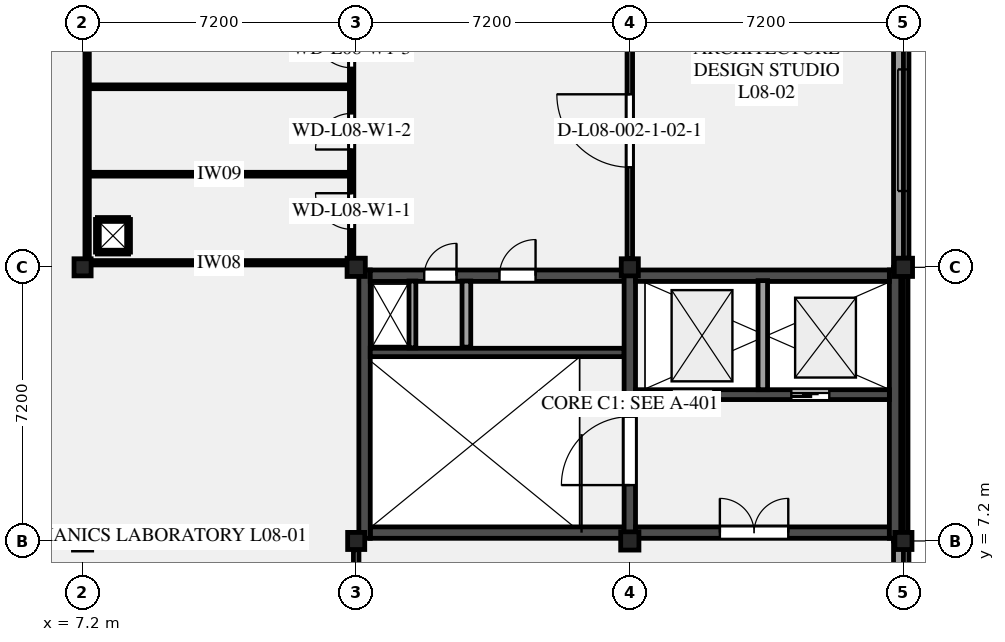
"""IFC4 building model, lengths in metres.
Left out: names, types, materials, properties, quantities, classifications, styles, units other than length and angle.
Written with IfcOpenShell. Run it as: python <this file> out.ifc"""

import sys

from ifc_helpers import new_model, si_unit, direction, frame, frame_2d, origin, origin_2d, place, context, subcontext, project, spatial, rectangle, extrude, element, fill, save


model = new_model("IFC4")
c1 = context("Model", 3, precision=1e-05, world=origin(), true_north=direction((0.0, 1.0)))
c2 = subcontext(c1, "Body", "Model", "MODEL_VIEW")
j1 = project(units=[si_unit("LENGTHUNIT", "METRE"), si_unit("PLANEANGLEUNIT", "RADIAN")], contexts=[c1])
p1 = place(None, origin())
s1 = spatial("IfcSite", under=j1, at=p1, CompositionType="ELEMENT")
p2 = place(p1, origin())
s2 = spatial("IfcBuilding", under=s1, at=p2, CompositionType="ELEMENT")
p3 = place(p2, frame((0.0, 0.0, 34.5)))
s3 = spatial("IfcBuildingStorey", under=s2, at=p3, CompositionType="ELEMENT", Elevation=34.5)
p4 = place(p3, frame((7.2, 7.2, 0.0), z_axis=(0.0, 0.0, 1.0), x_axis=(1.0, 0.0, 0.0)))
e1 = element("IfcColumn", 1, at=p4, inside=s3, PredefinedType="COLUMN", context=c2, shape_type="SweptSolid", body=[
    extrude(rectangle(XDim=0.48, YDim=0.48, at=origin_2d()), origin(), (0.0, 0.0, 1.0), 3.695),
])
for number, where, z_axis, x_axis in (
    (2, (7.2, 14.4, 0.0), (0.0, 0.0, 1.0), (1.0, 0.0, 0.0)),
    (3, (14.4, 7.2, 0.0), (0.0, 0.0, 1.0), (1.0, 0.0, 0.0)),
):
    element("IfcColumn", number, at=place(p3, frame(where, z_axis=z_axis, x_axis=x_axis)), inside=s3, PredefinedType="COLUMN", context=c2, shape_type="SweptSolid", body=[
        extrude(rectangle(XDim=0.45, YDim=0.45, at=origin_2d()), origin(), (0.0, 0.0, 1.0), 3.695),
    ])
for number, where, z_axis, x_axis in (
    (4, (14.4, 14.4, 0.0), (0.0, 0.0, 1.0), (1.0, 0.0, 0.0)),
    (5, (21.6, 7.2, 0.0), (0.0, 0.0, 1.0), (1.0, 0.0, 0.0)),
):
    element("IfcColumn", number, at=place(p3, frame(where, z_axis=z_axis, x_axis=x_axis)), inside=s3, PredefinedType="COLUMN", context=c2, shape_type="SweptSolid", body=[
        extrude(rectangle(XDim=0.48, YDim=0.48, at=origin_2d()), origin(), (0.0, 0.0, 1.0), 3.695),
    ])
for number, where, z_axis, x_axis in (
    (6, (21.6, 14.4, 0.0), (0.0, 0.0, 1.0), (1.0, 0.0, 0.0)),
    (7, (28.8, 7.2, 0.0), (0.0, 0.0, 1.0), (1.0, 0.0, 0.0)),
):
    element("IfcColumn", number, at=place(p3, frame(where, z_axis=z_axis, x_axis=x_axis)), inside=s3, PredefinedType="COLUMN", context=c2, shape_type="SweptSolid", body=[
        extrude(rectangle(XDim=0.45, YDim=0.45, at=origin_2d()), origin(), (0.0, 0.0, 1.0), 3.695),
    ])
p5 = place(p3, frame((28.8, 14.4, 0.0), z_axis=(0.0, 0.0, 1.0), x_axis=(1.0, 0.0, 0.0)))
e8 = element("IfcColumn", 8, at=p5, inside=s3, PredefinedType="COLUMN", context=c2, shape_type="SweptSolid", body=[
    extrude(rectangle(XDim=0.48, YDim=0.48, at=origin_2d()), origin(), (0.0, 0.0, 1.0), 3.695),
])
p6 = place(p3, frame((28.8, 21.375, 0.0), z_axis=(0.0, 0.0, 1.0), x_axis=(0.0, -1.0, 0.0)))
e9 = element("IfcWall", 9, at=p6, inside=s3, PredefinedType="STANDARD", context=c2, shape_type="SweptSolid", body=[
    extrude(rectangle(XDim=6.735, YDim=0.29, at=frame_2d((3.368, 0.0))), origin(), (0.0, 0.0, 1.0), 2.89),
])
p7 = place(p6, frame((1.768, 0.0, 0.98)))
e10 = element("IfcOpeningElement", 10, at=p7, cuts=e9, PredefinedType="OPENING", context=c2, shape_type="SweptSolid", body=[
    extrude(rectangle(XDim=3.2, YDim=1.45, at=frame_2d((1.6, 0.725))), frame((0.0, 0.155, 0.0), z_axis=(0.0, -1.0, 0.0), x_axis=(1.0, 0.0, 0.0)), (0.0, 0.0, 1.0), 0.31),
])
p8 = place(p3, frame((28.8, 14.16, 0.0), z_axis=(0.0, 0.0, 1.0), x_axis=(0.0, -1.0, 0.0)))
e11 = element("IfcWall", 11, at=p8, inside=s3, PredefinedType="STANDARD", context=c2, shape_type="SweptSolid", body=[
    extrude(rectangle(XDim=6.735, YDim=0.24, at=frame_2d((3.367, 0.0))), origin(), (0.0, 0.0, 1.0), 2.89),
])
p9 = place(p3, frame((28.8, 6.975, 0.0), z_axis=(0.0, 0.0, 1.0), x_axis=(0.0, -1.0, 0.0)))
e12 = element("IfcWall", 12, at=p9, inside=s3, PredefinedType="STANDARD", context=c2, shape_type="SweptSolid", body=[
    extrude(rectangle(XDim=6.735, YDim=0.29, at=frame_2d((3.368, 0.0))), origin(), (0.0, 0.0, 1.0), 2.89),
])
p10 = place(p9, frame((2.167, 0.0, 0.98)))
e13 = element("IfcOpeningElement", 13, at=p10, cuts=e12, PredefinedType="OPENING", context=c2, shape_type="SweptSolid", body=[
    extrude(rectangle(XDim=2.4, YDim=1.4, at=frame_2d((1.2, 0.7))), frame((0.0, 0.155, 0.0), z_axis=(0.0, -1.0, 0.0), x_axis=(1.0, 0.0, 0.0)), (0.0, 0.0, 1.0), 0.31),
])
p11 = place(p3, frame((28.67, 21.6, 3.695), z_axis=(0.0, 0.0, 1.0), x_axis=(0.0, -1.0, 0.0)))
e14 = element("IfcWall", 14, at=p11, inside=s3, PredefinedType="PARAPET", context=c2, shape_type="SweptSolid", body=[
    extrude(rectangle(XDim=7.2, YDim=0.26, at=frame_2d((3.6, 0.0))), origin(), (0.0, 0.0, 1.0), 1.105),
])
p12 = place(p3, frame((28.67, 14.4, 3.9), z_axis=(0.0, 0.0, 1.0), x_axis=(0.0, -1.0, 0.0)))
e15 = element("IfcWall", 15, at=p12, inside=s3, PredefinedType="PARAPET", context=c2, shape_type="SweptSolid", body=[
    extrude(rectangle(XDim=7.2, YDim=0.26, at=frame_2d((3.6, 0.0))), origin(), (0.0, 0.0, 1.0), 0.9),
])
p13 = place(p3, frame((28.67, 7.2, 3.695), z_axis=(0.0, 0.0, 1.0), x_axis=(0.0, -1.0, 0.0)))
e16 = element("IfcWall", 16, at=p13, inside=s3, PredefinedType="PARAPET", context=c2, shape_type="SweptSolid", body=[
    extrude(rectangle(XDim=7.2, YDim=0.26, at=frame_2d((3.6, 0.0))), origin(), (0.0, 0.0, 1.0), 1.105),
])
p14 = place(p3, frame((14.77, 7.42, 0.0), z_axis=(0.0, 0.0, 1.0), x_axis=(1.0, 0.0, 0.0)))
e17 = element("IfcWall", 17, at=p14, inside=s3, PredefinedType="SHEAR", context=c2, shape_type="SweptSolid", body=[
    extrude(rectangle(XDim=6.68, YDim=0.3, at=frame_2d((3.34, 0.0))), origin(), (0.0, 0.0, 1.0), 3.9),
])
p15 = place(p3, frame((14.62, 14.33, 0.0), z_axis=(0.0, 0.0, 1.0), x_axis=(0.0, -1.0, 0.0)))
e18 = element("IfcWall", 18, at=p15, inside=s3, PredefinedType="SHEAR", context=c2, shape_type="SweptSolid", body=[
    extrude(rectangle(XDim=7.06, YDim=0.3, at=frame_2d((3.53, 0.0))), origin(), (0.0, 0.0, 1.0), 3.9),
])
p16 = place(p3, frame((14.77, 14.18, 0.0), z_axis=(0.0, 0.0, 1.0), x_axis=(1.0, 0.0, 0.0)))
e19 = element("IfcWall", 19, at=p16, inside=s3, PredefinedType="SHEAR", context=c2, shape_type="SweptSolid", body=[
    extrude(rectangle(XDim=6.68, YDim=0.3, at=frame_2d((3.34, 0.0))), origin(), (0.0, 0.0, 1.0), 3.9),
])
p17 = place(p16, frame((1.42, 0.0, 0.0)))
e20 = element("IfcOpeningElement", 20, at=p17, cuts=e19, PredefinedType="OPENING", context=c2, shape_type="SweptSolid", body=[
    extrude(rectangle(XDim=0.85, YDim=2.1, at=frame_2d((0.425, 1.05))), frame((0.0, 0.16, 0.0), z_axis=(0.0, -1.0, 0.0), x_axis=(1.0, 0.0, 0.0)), (0.0, 0.0, 1.0), 0.32),
])
p18 = place(p16, frame((3.4, 0.0, 0.0)))
e21 = element("IfcOpeningElement", 21, at=p18, cuts=e19, PredefinedType="OPENING", context=c2, shape_type="SweptSolid", body=[
    extrude(rectangle(XDim=0.95, YDim=2.15, at=frame_2d((0.475, 1.075))), frame((0.0, 0.16, 0.0), z_axis=(0.0, -1.0, 0.0), x_axis=(1.0, 0.0, 0.0)), (0.0, 0.0, 1.0), 0.32),
])
p19 = place(p3, frame((14.77, 12.16, 0.0), z_axis=(0.0, 0.0, 1.0), x_axis=(1.0, 0.0, 0.0)))
e22 = element("IfcWall", 22, at=p19, inside=s3, PredefinedType="SHEAR", context=c2, shape_type="SweptSolid", body=[
    extrude(rectangle(XDim=6.68, YDim=0.22, at=frame_2d((3.34, 0.0))), origin(), (0.0, 0.0, 1.0), 3.9),
])
p20 = place(p3, frame((17.3, 12.3, 0.0), z_axis=(0.0, 0.0, 1.0), x_axis=(0.0, 1.0, 0.0)))
e23 = element("IfcWall", 23, at=p20, inside=s3, PredefinedType="PARTITIONING", context=c2, shape_type="SweptSolid", body=[
    extrude(rectangle(XDim=1.74, YDim=0.23, at=frame_2d((0.87, 0.0))), origin(), (0.0, 0.0, 1.0), 3.9),
])
p21 = place(p3, frame((15.88, 12.28, 0.0), z_axis=(0.0, 0.0, 1.0), x_axis=(0.0, 1.0, 0.0)))
e24 = element("IfcWall", 24, at=p21, inside=s3, PredefinedType="PARTITIONING", context=c2, shape_type="SweptSolid", body=[
    extrude(rectangle(XDim=1.76, YDim=0.18, at=frame_2d((0.88, 0.0))), origin(), (0.0, 0.0, 1.0), 3.9),
])
p22 = place(p3, frame((21.6, 7.27, 0.0), z_axis=(0.0, 0.0, 1.0), x_axis=(0.0, 1.0, 0.0)))
e25 = element("IfcWall", 25, at=p22, inside=s3, PredefinedType="SHEAR", context=c2, shape_type="SweptSolid", body=[
    extrude(rectangle(XDim=7.06, YDim=0.3, at=frame_2d((3.53, 0.0))), origin(), (0.0, 0.0, 1.0), 3.9),
])
p23 = place(p22, frame((1.4, 0.0, 0.0)))
e26 = element("IfcOpeningElement", 26, at=p23, cuts=e25, PredefinedType="OPENING", context=c2, shape_type="SweptSolid", body=[
    extrude(rectangle(XDim=1.8, YDim=2.2, at=frame_2d((0.9, 1.1))), frame((0.0, 0.16, 0.0), z_axis=(0.0, -1.0, 0.0), x_axis=(1.0, 0.0, 0.0)), (0.0, 0.0, 1.0), 0.32),
])
p24 = place(p3, frame((21.75, 7.42, 0.0), z_axis=(0.0, 0.0, 1.0), x_axis=(1.0, 0.0, 0.0)))
e27 = element("IfcWall", 27, at=p24, inside=s3, PredefinedType="SHEAR", context=c2, shape_type="SweptSolid", body=[
    extrude(rectangle(XDim=6.68, YDim=0.3, at=frame_2d((3.34, 0.0))), origin(), (0.0, 0.0, 1.0), 3.9),
])
p25 = place(p24, frame((2.22, 0.0, 0.0)))
e28 = element("IfcOpeningElement", 28, at=p25, cuts=e27, PredefinedType="OPENING", context=c2, shape_type="SweptSolid", body=[
    extrude(rectangle(XDim=1.8, YDim=2.2, at=frame_2d((0.9, 1.1))), frame((0.0, 0.16, 0.0), z_axis=(0.0, -1.0, 0.0), x_axis=(1.0, 0.0, 0.0)), (0.0, 0.0, 1.0), 0.32),
])
p26 = place(p3, frame((28.58, 7.27, 0.0), z_axis=(0.0, 0.0, 1.0), x_axis=(0.0, 1.0, 0.0)))
e29 = element("IfcWall", 29, at=p26, inside=s3, PredefinedType="SHEAR", context=c2, shape_type="SweptSolid", body=[
    extrude(rectangle(XDim=7.06, YDim=0.3, at=frame_2d((3.53, 0.0))), origin(), (0.0, 0.0, 1.0), 3.9),
])
p27 = place(p3, frame((21.75, 14.18, 0.0), z_axis=(0.0, 0.0, 1.0), x_axis=(1.0, 0.0, 0.0)))
e30 = element("IfcWall", 30, at=p27, inside=s3, PredefinedType="SHEAR", context=c2, shape_type="SweptSolid", body=[
    extrude(rectangle(XDim=6.68, YDim=0.3, at=frame_2d((3.34, 0.0))), origin(), (0.0, 0.0, 1.0), 3.9),
])
p28 = place(p3, frame((21.75, 11.05, 0.0), z_axis=(0.0, 0.0, 1.0), x_axis=(1.0, 0.0, 0.0)))
e31 = element("IfcWall", 31, at=p28, inside=s3, PredefinedType="SHEAR", context=c2, shape_type="SweptSolid", body=[
    extrude(rectangle(XDim=6.68, YDim=0.26, at=frame_2d((3.34, 0.0))), origin(), (0.0, 0.0, 1.0), 3.9),
])
p29 = place(p28, frame((0.95, 0.0, 0.0)))
e32 = element("IfcOpeningElement", 32, at=p29, cuts=e31, PredefinedType="OPENING", context=c2, shape_type="SweptSolid", body=[
    extrude(rectangle(XDim=1.1, YDim=2.2, at=frame_2d((0.55, 1.1))), frame((0.0, 0.14, 0.0), z_axis=(0.0, -1.0, 0.0), x_axis=(1.0, 0.0, 0.0)), (0.0, 0.0, 1.0), 0.28),
])
p30 = place(p28, frame((4.1, 0.0, 0.0)))
e33 = element("IfcOpeningElement", 33, at=p30, cuts=e31, PredefinedType="OPENING", context=c2, shape_type="SweptSolid", body=[
    extrude(rectangle(XDim=1.0, YDim=2.15, at=frame_2d((0.5, 1.075))), frame((0.0, 0.14, 0.0), z_axis=(0.0, -1.0, 0.0), x_axis=(1.0, 0.0, 0.0)), (0.0, 0.0, 1.0), 0.28),
])
p31 = place(p3, frame((25.1, 11.18, 0.0), z_axis=(0.0, 0.0, 1.0), x_axis=(0.0, 1.0, 0.0)))
e34 = element("IfcWall", 34, at=p31, inside=s3, PredefinedType="PARTITIONING", context=c2, shape_type="SweptSolid", body=[
    extrude(rectangle(XDim=2.87, YDim=0.25, at=frame_2d((1.435, 0.0))), origin(), (0.0, 0.0, 1.0), 3.9),
])
for number, where, z_axis, x_axis in (
    (35, (7.43, 14.52, 0.0), (0.0, 0.0, 1.0), (1.0, 0.0, 0.0)),
    (36, (7.32, 14.63, 0.0), (0.0, 0.0, 1.0), (0.0, 1.0, 0.0)),
):
    element("IfcWall", number, at=place(p3, frame(where, z_axis=z_axis, x_axis=x_axis)), inside=s3, PredefinedType="PARTITIONING", context=c2, shape_type="SweptSolid", body=[
        extrude(rectangle(XDim=6.725, YDim=0.115, at=frame_2d((3.363, 0.0))), origin(), (0.0, 0.0, 1.0), 2.89),
    ])
p32 = place(p3, frame((14.28, 14.645, 0.0), z_axis=(0.0, 0.0, 1.0), x_axis=(0.0, 1.0, 0.0)))
e37 = element("IfcWall", 37, at=p32, inside=s3, PredefinedType="PARTITIONING", context=c2, shape_type="SweptSolid", body=[
    extrude(rectangle(XDim=6.725, YDim=0.115, at=frame_2d((3.363, 0.0))), origin(), (0.0, 0.0, 1.0), 2.89),
])
p33 = place(p32, frame((0.755, 0.0, 0.0)))
e38 = element("IfcOpeningElement", 38, at=p33, cuts=e37, PredefinedType="OPENING", context=c2, shape_type="SweptSolid", body=[
    extrude(rectangle(XDim=0.95, YDim=2.1, at=frame_2d((0.475, 1.05))), frame((0.0, 0.067, 0.0), z_axis=(0.0, -1.0, 0.0), x_axis=(1.0, 0.0, 0.0)), (0.0, 0.0, 1.0), 0.135),
])
p34 = place(p32, frame((2.855, 0.0, 0.0)))
e39 = element("IfcOpeningElement", 39, at=p34, cuts=e37, PredefinedType="OPENING", context=c2, shape_type="SweptSolid", body=[
    extrude(rectangle(XDim=0.95, YDim=2.1, at=frame_2d((0.475, 1.05))), frame((0.0, 0.067, 0.0), z_axis=(0.0, -1.0, 0.0), x_axis=(1.0, 0.0, 0.0)), (0.0, 0.0, 1.0), 0.135),
])
p35 = place(p32, frame((5.005, 0.0, 0.0)))
e40 = element("IfcOpeningElement", 40, at=p35, cuts=e37, PredefinedType="OPENING", context=c2, shape_type="SweptSolid", body=[
    extrude(rectangle(XDim=1.0, YDim=2.15, at=frame_2d((0.5, 1.075))), frame((0.0, 0.067, 0.0), z_axis=(0.0, -1.0, 0.0), x_axis=(1.0, 0.0, 0.0)), (0.0, 0.0, 1.0), 0.135),
])
for number, where, z_axis, x_axis in (
    (41, (7.4, 16.85, 0.0), (0.0, 0.0, 1.0), (1.0, 0.0, 0.0)),
    (42, (7.4, 19.15, 0.0), (0.0, 0.0, 1.0), (1.0, 0.0, 0.0)),
):
    element("IfcWall", number, at=place(p3, frame(where, z_axis=z_axis, x_axis=x_axis)), inside=s3, PredefinedType="PARTITIONING", context=c2, shape_type="SweptSolid", body=[
        extrude(rectangle(XDim=6.8, YDim=0.1, at=frame_2d((3.4, 0.0))), origin(), (0.0, 0.0, 1.0), 3.9),
    ])
p36 = place(p3, frame((7.59, 14.8, 0.0), z_axis=(0.0, 0.0, 1.0), x_axis=(1.0, 0.0, 0.0)))
e43 = element("IfcWall", 43, at=p36, inside=s3, PredefinedType="PARTITIONING", context=c2, shape_type="SweptSolid", body=[
    extrude(rectangle(XDim=0.82, YDim=0.1, at=frame_2d((0.41, 0.0))), origin(), (0.0, 0.0, 1.0), 3.9),
])
p37 = place(p3, frame((8.41, 14.8, 0.0), z_axis=(0.0, 0.0, 1.0), x_axis=(0.0, 1.0, 0.0)))
e44 = element("IfcWall", 44, at=p37, inside=s3, PredefinedType="PARTITIONING", context=c2, shape_type="SweptSolid", body=[
    extrude(rectangle(XDim=0.86, YDim=0.1, at=frame_2d((0.43, 0.0))), origin(), (0.0, 0.0, 1.0), 3.9),
])
p38 = place(p3, frame((8.41, 15.66, 0.0), z_axis=(0.0, 0.0, 1.0), x_axis=(-1.0, 0.0, 0.0)))
e45 = element("IfcWall", 45, at=p38, inside=s3, PredefinedType="PARTITIONING", context=c2, shape_type="SweptSolid", body=[
    extrude(rectangle(XDim=0.82, YDim=0.1, at=frame_2d((0.41, 0.0))), origin(), (0.0, 0.0, 1.0), 3.9),
])
p39 = place(p3, frame((7.59, 15.66, 0.0), z_axis=(0.0, 0.0, 1.0), x_axis=(0.0, -1.0, 0.0)))
e46 = element("IfcWall", 46, at=p39, inside=s3, PredefinedType="PARTITIONING", context=c2, shape_type="SweptSolid", body=[
    extrude(rectangle(XDim=0.86, YDim=0.1, at=frame_2d((0.43, 0.0))), origin(), (0.0, 0.0, 1.0), 3.9),
])
p40 = place(p3, frame((14.4, 0.245, 0.0), z_axis=(0.0, 0.0, 1.0), x_axis=(0.0, 1.0, 0.0)))
e47 = element("IfcWall", 47, at=p40, inside=s3, PredefinedType="PARTITIONING", context=c2, shape_type="SweptSolid", body=[
    extrude(rectangle(XDim=6.725, YDim=0.145, at=frame_2d((3.362, 0.0))), origin(), (0.0, 0.0, 1.0), 2.89),
])
p41 = place(p40, frame((2.887, 0.0, 0.0)))
e48 = element("IfcOpeningElement", 48, at=p41, cuts=e47, PredefinedType="OPENING", context=c2, shape_type="SweptSolid", body=[
    extrude(rectangle(XDim=0.95, YDim=2.15, at=frame_2d((0.475, 1.075))), frame((0.0, 0.083, 0.0), z_axis=(0.0, -1.0, 0.0), x_axis=(1.0, 0.0, 0.0)), (0.0, 0.0, 1.0), 0.165),
])
p42 = place(p3, frame((21.6, 14.63, 0.0), z_axis=(0.0, 0.0, 1.0), x_axis=(0.0, 1.0, 0.0)))
e49 = element("IfcWall", 49, at=p42, inside=s3, PredefinedType="PARTITIONING", context=c2, shape_type="SweptSolid", body=[
    extrude(rectangle(XDim=6.725, YDim=0.145, at=frame_2d((3.363, 0.0))), origin(), (0.0, 0.0, 1.0), 2.89),
])
p43 = place(p42, frame((2.403, 0.0, 0.0)))
e50 = element("IfcOpeningElement", 50, at=p43, cuts=e49, PredefinedType="OPENING", context=c2, shape_type="SweptSolid", body=[
    extrude(rectangle(XDim=1.92, YDim=2.35, at=frame_2d((0.96, 1.175))), frame((0.0, 0.083, 0.0), z_axis=(0.0, -1.0, 0.0), x_axis=(1.0, 0.0, 0.0)), (0.0, 0.0, 1.0), 0.165),
])
p44 = place(p7, origin())
e51 = element("IfcWindow", 51, at=p44, inside=s3, PartitioningType="SINGLE_PANEL", PredefinedType="WINDOW", context=c2, shape_type="SweptSolid", body=[
    extrude(rectangle(XDim=3.2, YDim=1.45, at=frame_2d((1.6, 0.725))), frame((0.0, -0.03, 0.0), z_axis=(0.0, -1.0, 0.0), x_axis=(1.0, 0.0, 0.0)), (0.0, 0.0, 1.0), 0.06),
])
fill(e10, e51)
p45 = place(p17, origin())
e52 = element("IfcDoor", 52, at=p45, inside=s3, OperationType="SINGLE_SWING_RIGHT", PredefinedType="DOOR", context=c2, shape_type="SweptSolid", body=[
    extrude(rectangle(XDim=0.85, YDim=2.1, at=frame_2d((0.425, 1.05))), frame((0.0, 0.025, 0.0), z_axis=(0.0, -1.0, 0.0), x_axis=(1.0, 0.0, 0.0)), (0.0, 0.0, 1.0), 0.05),
])
fill(e20, e52)
p46 = place(p23, origin())
e53 = element("IfcDoor", 53, at=p46, inside=s3, OperationType="SINGLE_SWING_LEFT", PredefinedType="DOOR", context=c2, shape_type="SweptSolid", body=[
    extrude(rectangle(XDim=1.8, YDim=2.2, at=frame_2d((0.9, 1.1))), frame((0.0, 0.025, 0.0), z_axis=(0.0, -1.0, 0.0), x_axis=(1.0, 0.0, 0.0)), (0.0, 0.0, 1.0), 0.05),
])
fill(e26, e53)
p47 = place(p18, origin())
e54 = element("IfcDoor", 54, at=p47, inside=s3, OperationType="SINGLE_SWING_RIGHT", PredefinedType="DOOR", context=c2, shape_type="SweptSolid", body=[
    extrude(rectangle(XDim=0.95, YDim=2.15, at=frame_2d((0.475, 1.075))), frame((0.0, 0.025, 0.0), z_axis=(0.0, -1.0, 0.0), x_axis=(1.0, 0.0, 0.0)), (0.0, 0.0, 1.0), 0.05),
])
fill(e21, e54)
p48 = place(p29, origin())
e55 = element("IfcDoor", 55, at=p48, inside=s3, OperationType="SLIDING_TO_LEFT", PredefinedType="DOOR", context=c2, shape_type="SweptSolid", body=[
    extrude(rectangle(XDim=1.1, YDim=2.2, at=frame_2d((0.55, 1.1))), frame((0.0, 0.025, 0.0), z_axis=(0.0, -1.0, 0.0), x_axis=(1.0, 0.0, 0.0)), (0.0, 0.0, 1.0), 0.05),
])
fill(e32, e55)
p49 = place(p30, origin())
e56 = element("IfcDoor", 56, at=p49, inside=s3, OperationType="SLIDING_TO_RIGHT", PredefinedType="DOOR", context=c2, shape_type="SweptSolid", body=[
    extrude(rectangle(XDim=1.0, YDim=2.15, at=frame_2d((0.5, 1.075))), frame((0.0, 0.025, 0.0), z_axis=(0.0, -1.0, 0.0), x_axis=(1.0, 0.0, 0.0)), (0.0, 0.0, 1.0), 0.05),
])
fill(e33, e56)
p50 = place(p25, origin())
e57 = element("IfcDoor", 57, at=p50, inside=s3, OperationType="DOUBLE_DOOR_SINGLE_SWING", PredefinedType="DOOR", context=c2, shape_type="SweptSolid", body=[
    extrude(rectangle(XDim=1.8, YDim=2.2, at=frame_2d((0.9, 1.1))), frame((0.0, 0.025, 0.0), z_axis=(0.0, -1.0, 0.0), x_axis=(1.0, 0.0, 0.0)), (0.0, 0.0, 1.0), 0.05),
])
fill(e28, e57)
p51 = place(p33, origin())
e58 = element("IfcDoor", 58, at=p51, inside=s3, OperationType="SINGLE_SWING_RIGHT", PredefinedType="DOOR", context=c2, shape_type="SweptSolid", body=[
    extrude(rectangle(XDim=0.95, YDim=2.1, at=frame_2d((0.475, 1.05))), frame((0.0, 0.025, 0.0), z_axis=(0.0, -1.0, 0.0), x_axis=(1.0, 0.0, 0.0)), (0.0, 0.0, 1.0), 0.05),
])
fill(e38, e58)
p52 = place(p34, origin())
e59 = element("IfcDoor", 59, at=p52, inside=s3, OperationType="SINGLE_SWING_LEFT", PredefinedType="DOOR", context=c2, shape_type="SweptSolid", body=[
    extrude(rectangle(XDim=0.95, YDim=2.1, at=frame_2d((0.475, 1.05))), frame((0.0, 0.025, 0.0), z_axis=(0.0, -1.0, 0.0), x_axis=(1.0, 0.0, 0.0)), (0.0, 0.0, 1.0), 0.05),
])
fill(e39, e59)
p53 = place(p35, origin())
e60 = element("IfcDoor", 60, at=p53, inside=s3, OperationType="SINGLE_SWING_RIGHT", PredefinedType="DOOR", context=c2, shape_type="SweptSolid", body=[
    extrude(rectangle(XDim=1.0, YDim=2.15, at=frame_2d((0.5, 1.075))), frame((0.0, 0.025, 0.0), z_axis=(0.0, -1.0, 0.0), x_axis=(1.0, 0.0, 0.0)), (0.0, 0.0, 1.0), 0.05),
])
fill(e40, e60)
p54 = place(p43, origin())
e61 = element("IfcDoor", 61, at=p54, inside=s3, OperationType="SINGLE_SWING_RIGHT", PredefinedType="DOOR", context=c2, shape_type="SweptSolid", body=[
    extrude(rectangle(XDim=1.92, YDim=2.35, at=frame_2d((0.96, 1.175))), frame((0.0, 0.025, 0.0), z_axis=(0.0, -1.0, 0.0), x_axis=(1.0, 0.0, 0.0)), (0.0, 0.0, 1.0), 0.05),
])
fill(e50, e61)
save(model, sys.argv[1])
